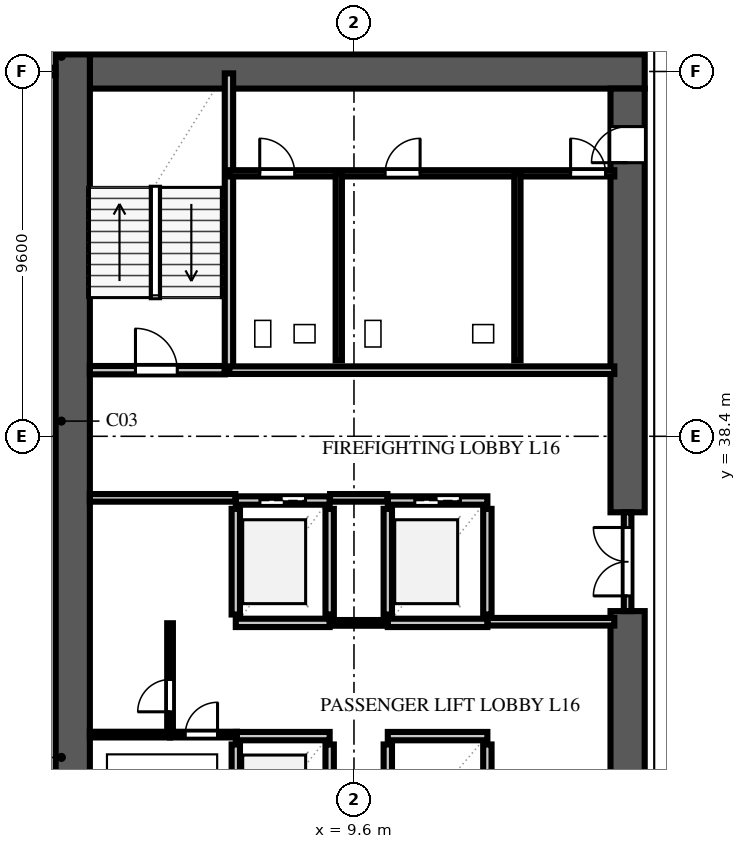
"""IFC4 building model, lengths in metres.
Left out: names, types, materials, properties, quantities, classifications, styles, units other than length and angle.
Written with IfcOpenShell. Run it as: python <this file> out.ifc"""

import sys

from ifc_helpers import new_model, si_unit, direction, frame, frame_2d, origin, place, context, subcontext, project, spatial, rectangle, extrude, element, fill, save


model = new_model("IFC4")
c1 = context("Model", 3, precision=1e-05, world=origin(), true_north=direction((0.0, 1.0)))
c2 = subcontext(c1, "Body", "Model", "MODEL_VIEW")
j1 = project(units=[si_unit("LENGTHUNIT", "METRE"), si_unit("PLANEANGLEUNIT", "RADIAN")], contexts=[c1])
p1 = place(None, origin())
s1 = spatial("IfcSite", under=j1, at=p1, CompositionType="ELEMENT")
p2 = place(p1, origin())
s2 = spatial("IfcBuilding", under=s1, at=p2, CompositionType="ELEMENT")
p3 = place(p2, frame((0.0, 0.0, 66.0)))
s3 = spatial("IfcBuildingStorey", under=s2, at=p3, CompositionType="ELEMENT", Elevation=66.0)
p4 = place(p3, frame((2.65, 48.0, 0.0), z_axis=(0.0, 0.0, 1.0), x_axis=(1.0, 0.0, 0.0)))
e1 = element("IfcWall", 1, at=p4, inside=s3, PredefinedType="SHEAR", context=c2, shape_type="SweptSolid", body=[
    extrude(rectangle(XDim=14.6, YDim=0.9, at=frame_2d((7.3, 0.0))), origin(), (0.0, 0.0, 1.0), 3.54),
])
p5 = place(p3, frame((2.2, 9.15, 0.0), z_axis=(0.0, 0.0, 1.0), x_axis=(0.0, 1.0, 0.0)))
e2 = element("IfcWall", 2, at=p5, inside=s3, PredefinedType="SHEAR", context=c2, shape_type="SweptSolid", body=[
    extrude(rectangle(XDim=39.3, YDim=0.9, at=frame_2d((19.65, 0.0))), origin(), (0.0, 0.0, 1.0), 3.54),
])
p6 = place(p3, frame((16.8, 26.0, 0.0), z_axis=(0.0, 0.0, 1.0), x_axis=(0.0, 1.0, 0.0)))
e3 = element("IfcWall", 3, at=p6, inside=s3, PredefinedType="SHEAR", context=c2, shape_type="SweptSolid", body=[
    extrude(rectangle(XDim=7.8, YDim=0.9, at=frame_2d((3.9, 0.0))), origin(), (0.0, 0.0, 1.0), 3.54),
])
p7 = place(p3, frame((16.8, 36.4, 0.0), z_axis=(0.0, 0.0, 1.0), x_axis=(0.0, 1.0, 0.0)))
e4 = element("IfcWall", 4, at=p7, inside=s3, PredefinedType="SHEAR", context=c2, shape_type="SweptSolid", body=[
    extrude(rectangle(XDim=11.15, YDim=0.9, at=frame_2d((5.575, 0.0))), origin(), (0.0, 0.0, 1.0), 3.54),
])
p8 = place(p7, frame((9.2, 0.0, 0.0)))
e5 = element("IfcOpeningElement", 5, at=p8, cuts=e4, PredefinedType="OPENING", context=c2, shape_type="SweptSolid", body=[
    extrude(rectangle(XDim=0.95, YDim=2.15, at=frame_2d((0.475, 1.075))), frame((0.0, 0.462, 0.0), z_axis=(0.0, -1.0, 0.0), x_axis=(1.0, 0.0, 0.0)), (0.0, 0.0, 1.0), 0.924),
])
p9 = place(p3, frame((2.65, 40.14, 0.0), z_axis=(0.0, 0.0, 1.0), x_axis=(1.0, 0.0, 0.0)))
e6 = element("IfcWall", 6, at=p9, inside=s3, PredefinedType="SOLIDWALL", context=c2, shape_type="SweptSolid", body=[
    extrude(rectangle(XDim=3.55, YDim=0.22, at=frame_2d((1.775, 0.0))), origin(), (0.0, 0.0, 1.0), 3.54),
])
p10 = place(p9, frame((1.2, 0.0, 0.0)))
e7 = element("IfcOpeningElement", 7, at=p10, cuts=e6, PredefinedType="OPENING", context=c2, shape_type="SweptSolid", body=[
    extrude(rectangle(XDim=1.1, YDim=2.2, at=frame_2d((0.55, 1.1))), frame((0.0, 0.122, 0.0), z_axis=(0.0, -1.0, 0.0), x_axis=(1.0, 0.0, 0.0)), (0.0, 0.0, 1.0), 0.244),
])
p11 = place(p3, frame((6.31, 40.14, 0.0), z_axis=(0.0, 0.0, 1.0), x_axis=(0.0, 1.0, 0.0)))
e8 = element("IfcWall", 8, at=p11, inside=s3, PredefinedType="SOLIDWALL", context=c2, shape_type="SweptSolid", body=[
    extrude(rectangle(XDim=7.81, YDim=0.22, at=frame_2d((3.905, 0.0))), origin(), (0.0, 0.0, 1.0), 3.54),
])
p12 = place(p3, frame((6.49, 27.71, 0.0), z_axis=(0.0, 0.0, 1.0), x_axis=(0.0, 1.0, 0.0)))
e9 = element("IfcWall", 9, at=p12, inside=s3, PredefinedType="SOLIDWALL", context=c2, shape_type="SweptSolid", body=[
    extrude(rectangle(XDim=2.58, YDim=0.22, at=frame_2d((1.29, 0.0))), origin(), (0.0, 0.0, 1.0), 3.54),
])
p13 = place(p3, frame((8.96, 27.71, 0.0), z_axis=(0.0, 0.0, 1.0), x_axis=(0.0, 1.0, 0.0)))
e10 = element("IfcWall", 10, at=p13, inside=s3, PredefinedType="SOLIDWALL", context=c2, shape_type="SweptSolid", body=[
    extrude(rectangle(XDim=2.58, YDim=0.22, at=frame_2d((1.29, 0.0))), origin(), (0.0, 0.0, 1.0), 3.54),
])
p14 = place(p13, frame((0.74, 0.0, 0.0)))
e11 = element("IfcOpeningElement", 11, at=p14, cuts=e10, PredefinedType="OPENING", context=c2, shape_type="SweptSolid", body=[
    extrude(rectangle(XDim=1.1, YDim=2.2, at=frame_2d((0.55, 1.1))), frame((0.0, 0.122, 0.0), z_axis=(0.0, -1.0, 0.0), x_axis=(1.0, 0.0, 0.0)), (0.0, 0.0, 1.0), 0.244),
])
p15 = place(p3, frame((6.49, 30.51, 0.0), z_axis=(0.0, 0.0, 1.0), x_axis=(1.0, 0.0, 0.0)))
e12 = element("IfcWall", 12, at=p15, inside=s3, PredefinedType="SOLIDWALL", context=c2, shape_type="SweptSolid", body=[
    extrude(rectangle(XDim=2.47, YDim=0.22, at=frame_2d((1.235, 0.0))), origin(), (0.0, 0.0, 1.0), 3.54),
])
for number, where, z_axis, x_axis in (
    (13, (10.49, 27.71, 0.0), (0.0, 0.0, 1.0), (0.0, 1.0, 0.0)),
    (14, (13.11, 27.71, 0.0), (0.0, 0.0, 1.0), (0.0, 1.0, 0.0)),
):
    element("IfcWall", number, at=place(p3, frame(where, z_axis=z_axis, x_axis=x_axis)), inside=s3, PredefinedType="SOLIDWALL", context=c2, shape_type="SweptSolid", body=[
        extrude(rectangle(XDim=2.58, YDim=0.22, at=frame_2d((1.29, 0.0))), origin(), (0.0, 0.0, 1.0), 3.54),
    ])
p16 = place(p3, frame((10.49, 30.51, 0.0), z_axis=(0.0, 0.0, 1.0), x_axis=(1.0, 0.0, 0.0)))
e15 = element("IfcWall", 15, at=p16, inside=s3, PredefinedType="SOLIDWALL", context=c2, shape_type="SweptSolid", body=[
    extrude(rectangle(XDim=2.62, YDim=0.22, at=frame_2d((1.31, 0.0))), origin(), (0.0, 0.0, 1.0), 3.54),
])
for number, where, z_axis, x_axis in (
    (16, (6.49, 33.71, 0.0), (0.0, 0.0, 1.0), (0.0, 1.0, 0.0)),
    (17, (8.96, 33.71, 0.0), (0.0, 0.0, 1.0), (0.0, 1.0, 0.0)),
):
    element("IfcWall", number, at=place(p3, frame(where, z_axis=z_axis, x_axis=x_axis)), inside=s3, PredefinedType="SOLIDWALL", context=c2, shape_type="SweptSolid", body=[
        extrude(rectangle(XDim=2.78, YDim=0.22, at=frame_2d((1.39, 0.0))), origin(), (0.0, 0.0, 1.0), 3.54),
    ])
p17 = place(p3, frame((6.49, 33.49, 0.0), z_axis=(0.0, 0.0, 1.0), x_axis=(1.0, 0.0, 0.0)))
e18 = element("IfcWall", 18, at=p17, inside=s3, PredefinedType="SOLIDWALL", context=c2, shape_type="SweptSolid", body=[
    extrude(rectangle(XDim=2.47, YDim=0.22, at=frame_2d((1.235, 0.0))), origin(), (0.0, 0.0, 1.0), 3.54),
])
p18 = place(p3, frame((6.49, 36.71, 0.0), z_axis=(0.0, 0.0, 1.0), x_axis=(1.0, 0.0, 0.0)))
e19 = element("IfcWall", 19, at=p18, inside=s3, PredefinedType="SOLIDWALL", context=c2, shape_type="SweptSolid", body=[
    extrude(rectangle(XDim=2.47, YDim=0.22, at=frame_2d((1.235, 0.0))), origin(), (0.0, 0.0, 1.0), 3.54),
])
p19 = place(p18, frame((0.635, 0.0, 0.0)))
e20 = element("IfcOpeningElement", 20, at=p19, cuts=e19, PredefinedType="OPENING", context=c2, shape_type="SweptSolid", body=[
    extrude(rectangle(XDim=1.2, YDim=2.2, at=frame_2d((0.6, 1.1))), frame((0.0, 0.122, 0.0), z_axis=(0.0, -1.0, 0.0), x_axis=(1.0, 0.0, 0.0)), (0.0, 0.0, 1.0), 0.244),
])
for number, where, z_axis, x_axis in (
    (21, (10.49, 33.71, 0.0), (0.0, 0.0, 1.0), (0.0, 1.0, 0.0)),
    (22, (13.11, 33.71, 0.0), (0.0, 0.0, 1.0), (0.0, 1.0, 0.0)),
):
    element("IfcWall", number, at=place(p3, frame(where, z_axis=z_axis, x_axis=x_axis)), inside=s3, PredefinedType="SOLIDWALL", context=c2, shape_type="SweptSolid", body=[
        extrude(rectangle(XDim=2.78, YDim=0.22, at=frame_2d((1.39, 0.0))), origin(), (0.0, 0.0, 1.0), 3.54),
    ])
p20 = place(p3, frame((10.49, 33.49, 0.0), z_axis=(0.0, 0.0, 1.0), x_axis=(1.0, 0.0, 0.0)))
e23 = element("IfcWall", 23, at=p20, inside=s3, PredefinedType="SOLIDWALL", context=c2, shape_type="SweptSolid", body=[
    extrude(rectangle(XDim=2.62, YDim=0.22, at=frame_2d((1.31, 0.0))), origin(), (0.0, 0.0, 1.0), 3.54),
])
p21 = place(p3, frame((10.49, 36.71, 0.0), z_axis=(0.0, 0.0, 1.0), x_axis=(1.0, 0.0, 0.0)))
e24 = element("IfcWall", 24, at=p21, inside=s3, PredefinedType="SOLIDWALL", context=c2, shape_type="SweptSolid", body=[
    extrude(rectangle(XDim=2.62, YDim=0.22, at=frame_2d((1.31, 0.0))), origin(), (0.0, 0.0, 1.0), 3.54),
])
p22 = place(p21, frame((0.71, 0.0, 0.0)))
e25 = element("IfcOpeningElement", 25, at=p22, cuts=e24, PredefinedType="OPENING", context=c2, shape_type="SweptSolid", body=[
    extrude(rectangle(XDim=1.2, YDim=2.2, at=frame_2d((0.6, 1.1))), frame((0.0, 0.122, 0.0), z_axis=(0.0, -1.0, 0.0), x_axis=(1.0, 0.0, 0.0)), (0.0, 0.0, 1.0), 0.244),
])
p23 = place(p3, frame((2.65, 36.78, 0.0), z_axis=(0.0, 0.0, 1.0), x_axis=(1.0, 0.0, 0.0)))
e26 = element("IfcWall", 26, at=p23, inside=s3, PredefinedType="SOLIDWALL", context=c2, shape_type="SweptSolid", body=[
    extrude(rectangle(XDim=3.83, YDim=0.2, at=frame_2d((1.915, 0.0))), origin(), (0.0, 0.0, 1.0), 3.54),
])
p24 = place(p3, frame((8.97, 36.78, 0.0), z_axis=(0.0, 0.0, 1.0), x_axis=(1.0, 0.0, 0.0)))
e27 = element("IfcWall", 27, at=p24, inside=s3, PredefinedType="SOLIDWALL", context=c2, shape_type="SweptSolid", body=[
    extrude(rectangle(XDim=1.51, YDim=0.2, at=frame_2d((0.755, 0.0))), origin(), (0.0, 0.0, 1.0), 3.54),
])
p25 = place(p3, frame((13.12, 33.52, 0.0), z_axis=(0.0, 0.0, 1.0), x_axis=(1.0, 0.0, 0.0)))
e28 = element("IfcWall", 28, at=p25, inside=s3, PredefinedType="SOLIDWALL", context=c2, shape_type="SweptSolid", body=[
    extrude(rectangle(XDim=3.33, YDim=0.2, at=frame_2d((1.665, 0.0))), origin(), (0.0, 0.0, 1.0), 3.54),
])
p26 = place(p3, frame((6.32, 40.14, 0.0), z_axis=(0.0, 0.0, 1.0), x_axis=(1.0, 0.0, 0.0)))
e29 = element("IfcWall", 29, at=p26, inside=s3, PredefinedType="SOLIDWALL", context=c2, shape_type="SweptSolid", body=[
    extrude(rectangle(XDim=10.13, YDim=0.2, at=frame_2d((5.065, 0.0))), origin(), (0.0, 0.0, 1.0), 3.54),
])
p27 = place(p3, frame((16.8, 33.8, 0.0), z_axis=(0.0, 0.0, 1.0), x_axis=(0.0, 1.0, 0.0)))
e30 = element("IfcWall", 30, at=p27, inside=s3, PredefinedType="SOLIDWALL", context=c2, shape_type="SweptSolid", body=[
    extrude(rectangle(XDim=2.6, YDim=0.2, at=frame_2d((1.3, 0.0))), origin(), (0.0, 0.0, 1.0), 3.54),
])
p28 = place(p27, frame((0.4, 0.0, 0.0)))
e31 = element("IfcOpeningElement", 31, at=p28, cuts=e30, PredefinedType="OPENING", context=c2, shape_type="SweptSolid", body=[
    extrude(rectangle(XDim=1.8, YDim=2.2, at=frame_2d((0.9, 1.1))), frame((0.0, 0.112, 0.0), z_axis=(0.0, -1.0, 0.0), x_axis=(1.0, 0.0, 0.0)), (0.0, 0.0, 1.0), 0.224),
])
p29 = place(p3, frame((8.965, 33.49, 0.0), z_axis=(0.0, 0.0, 1.0), x_axis=(1.0, 0.0, 0.0)))
e32 = element("IfcWall", 32, at=p29, inside=s3, PredefinedType="PARTITIONING", context=c2, shape_type="SweptSolid", body=[
    extrude(rectangle(XDim=1.52, YDim=0.15, at=frame_2d((0.76, 0.0))), origin(), (0.0, 0.0, 1.0), 3.54),
])
p30 = place(p3, frame((4.76, 30.55, 0.0), z_axis=(0.0, 0.0, 1.0), x_axis=(0.0, 1.0, 0.0)))
e33 = element("IfcWall", 33, at=p30, inside=s3, PredefinedType="PARTITIONING", context=c2, shape_type="SweptSolid", body=[
    extrude(rectangle(XDim=2.93, YDim=0.15, at=frame_2d((1.465, 0.0))), origin(), (0.0, 0.0, 1.0), 3.54),
])
p31 = place(p30, frame((0.6, 0.0, 0.0)))
e34 = element("IfcOpeningElement", 34, at=p31, cuts=e33, PredefinedType="OPENING", context=c2, shape_type="SweptSolid", body=[
    extrude(rectangle(XDim=0.85, YDim=2.1, at=frame_2d((0.425, 1.05))), frame((0.0, 0.087, 0.0), z_axis=(0.0, -1.0, 0.0), x_axis=(1.0, 0.0, 0.0)), (0.0, 0.0, 1.0), 0.174),
])
p32 = place(p3, frame((4.76, 30.55, 0.0), z_axis=(0.0, 0.0, 1.0), x_axis=(1.0, 0.0, 0.0)))
e35 = element("IfcWall", 35, at=p32, inside=s3, PredefinedType="PARTITIONING", context=c2, shape_type="SweptSolid", body=[
    extrude(rectangle(XDim=1.76, YDim=0.15, at=frame_2d((0.88, 0.0))), origin(), (0.0, 0.0, 1.0), 3.54),
])
p33 = place(p32, frame((0.4, 0.0, 0.0)))
e36 = element("IfcOpeningElement", 36, at=p33, cuts=e35, PredefinedType="OPENING", context=c2, shape_type="SweptSolid", body=[
    extrude(rectangle(XDim=0.85, YDim=2.1, at=frame_2d((0.425, 1.05))), frame((0.0, 0.087, 0.0), z_axis=(0.0, -1.0, 0.0), x_axis=(1.0, 0.0, 0.0)), (0.0, 0.0, 1.0), 0.174),
])
p34 = place(p3, frame((2.65, 30.55, 0.0), z_axis=(0.0, 0.0, 1.0), x_axis=(1.0, 0.0, 0.0)))
e37 = element("IfcWall", 37, at=p34, inside=s3, PredefinedType="PARTITIONING", context=c2, shape_type="SweptSolid", body=[
    extrude(rectangle(XDim=2.11, YDim=0.15, at=frame_2d((1.055, 0.0))), origin(), (0.0, 0.0, 1.0), 3.54),
])
p35 = place(p3, frame((6.32, 45.32, 0.0), z_axis=(0.0, 0.0, 1.0), x_axis=(1.0, 0.0, 0.0)))
e38 = element("IfcWall", 38, at=p35, inside=s3, PredefinedType="PLUMBINGWALL", context=c2, shape_type="SweptSolid", body=[
    extrude(rectangle(XDim=10.13, YDim=0.165, at=frame_2d((5.065, 0.0))), origin(), (0.0, 0.0, 1.0), 3.54),
])
p36 = place(p35, frame((0.8, 0.0, 0.0)))
e39 = element("IfcOpeningElement", 39, at=p36, cuts=e38, PredefinedType="OPENING", context=c2, shape_type="SweptSolid", body=[
    extrude(rectangle(XDim=0.92, YDim=2.15, at=frame_2d((0.46, 1.075))), frame((0.0, 0.094, 0.0), z_axis=(0.0, -1.0, 0.0), x_axis=(1.0, 0.0, 0.0)), (0.0, 0.0, 1.0), 0.189),
])
p37 = place(p35, frame((4.1, 0.0, 0.0)))
e40 = element("IfcOpeningElement", 40, at=p37, cuts=e38, PredefinedType="OPENING", context=c2, shape_type="SweptSolid", body=[
    extrude(rectangle(XDim=0.92, YDim=2.15, at=frame_2d((0.46, 1.075))), frame((0.0, 0.094, 0.0), z_axis=(0.0, -1.0, 0.0), x_axis=(1.0, 0.0, 0.0)), (0.0, 0.0, 1.0), 0.189),
])
p38 = place(p35, frame((8.98, 0.0, 0.0)))
e41 = element("IfcOpeningElement", 41, at=p38, cuts=e38, PredefinedType="OPENING", context=c2, shape_type="SweptSolid", body=[
    extrude(rectangle(XDim=0.92, YDim=2.15, at=frame_2d((0.46, 1.075))), frame((0.0, 0.094, 0.0), z_axis=(0.0, -1.0, 0.0), x_axis=(1.0, 0.0, 0.0)), (0.0, 0.0, 1.0), 0.189),
])
for number, where, z_axis, x_axis in (
    (42, (9.2, 40.4, 0.0), (0.0, 0.0, 1.0), (0.0, 1.0, 0.0)),
    (43, (13.9, 40.4, 0.0), (0.0, 0.0, 1.0), (0.0, 1.0, 0.0)),
):
    element("IfcWall", number, at=place(p3, frame(where, z_axis=z_axis, x_axis=x_axis)), inside=s3, PredefinedType="PLUMBINGWALL", context=c2, shape_type="SweptSolid", body=[
        extrude(rectangle(XDim=4.92, YDim=0.165, at=frame_2d((2.46, 0.0))), origin(), (0.0, 0.0, 1.0), 3.54),
    ])
p39 = place(p3, frame((0.85, 48.0, 0.0), z_axis=(0.0, 0.0, 1.0), x_axis=(1.0, 0.0, 0.0)))
e44 = element("IfcWall", 44, at=p39, inside=s3, PredefinedType="SOLIDWALL", context=c2, shape_type="SweptSolid", body=[
    extrude(rectangle(XDim=0.895, YDim=0.2, at=frame_2d((0.448, 0.0))), origin(), (0.0, 0.0, 1.0), 3.54),
])
p40 = place(p10, origin())
e45 = element("IfcDoor", 45, at=p40, inside=s3, OperationType="SINGLE_SWING_LEFT", PredefinedType="DOOR", context=c2, shape_type="SweptSolid", body=[
    extrude(rectangle(XDim=1.1, YDim=2.2, at=frame_2d((0.55, 1.1))), frame((0.0, 0.025, 0.0), z_axis=(0.0, -1.0, 0.0), x_axis=(1.0, 0.0, 0.0)), (0.0, 0.0, 1.0), 0.05),
])
fill(e7, e45)
p41 = place(p19, origin())
e46 = element("IfcDoor", 46, at=p41, inside=s3, OperationType="DOUBLE_DOOR_SLIDING", PredefinedType="DOOR", context=c2, shape_type="SweptSolid", body=[
    extrude(rectangle(XDim=1.2, YDim=2.2, at=frame_2d((0.6, 1.1))), frame((0.0, 0.025, 0.0), z_axis=(0.0, -1.0, 0.0), x_axis=(1.0, 0.0, 0.0)), (0.0, 0.0, 1.0), 0.05),
])
fill(e20, e46)
p42 = place(p22, origin())
e47 = element("IfcDoor", 47, at=p42, inside=s3, OperationType="DOUBLE_DOOR_SLIDING", PredefinedType="DOOR", context=c2, shape_type="SweptSolid", body=[
    extrude(rectangle(XDim=1.2, YDim=2.2, at=frame_2d((0.6, 1.1))), frame((0.0, 0.025, 0.0), z_axis=(0.0, -1.0, 0.0), x_axis=(1.0, 0.0, 0.0)), (0.0, 0.0, 1.0), 0.05),
])
fill(e25, e47)
p43 = place(p8, origin())
e48 = element("IfcDoor", 48, at=p43, inside=s3, OperationType="SINGLE_SWING_LEFT", PredefinedType="DOOR", context=c2, shape_type="SweptSolid", body=[
    extrude(rectangle(XDim=0.95, YDim=2.15, at=frame_2d((0.475, 1.075))), frame((0.0, 0.025, 0.0), z_axis=(0.0, -1.0, 0.0), x_axis=(1.0, 0.0, 0.0)), (0.0, 0.0, 1.0), 0.05),
])
fill(e5, e48)
p44 = place(p28, origin())
e49 = element("IfcDoor", 49, at=p44, inside=s3, OperationType="DOUBLE_DOOR_SINGLE_SWING", PredefinedType="DOOR", context=c2, shape_type="SweptSolid", body=[
    extrude(rectangle(XDim=1.8, YDim=2.2, at=frame_2d((0.9, 1.1))), frame((0.0, 0.025, 0.0), z_axis=(0.0, -1.0, 0.0), x_axis=(1.0, 0.0, 0.0)), (0.0, 0.0, 1.0), 0.05),
])
fill(e31, e49)
p45 = place(p31, origin())
e50 = element("IfcDoor", 50, at=p45, inside=s3, OperationType="SINGLE_SWING_LEFT", PredefinedType="DOOR", context=c2, shape_type="SweptSolid", body=[
    extrude(rectangle(XDim=0.85, YDim=2.1, at=frame_2d((0.425, 1.05))), frame((0.0, 0.025, 0.0), z_axis=(0.0, -1.0, 0.0), x_axis=(1.0, 0.0, 0.0)), (0.0, 0.0, 1.0), 0.05),
])
fill(e34, e50)
p46 = place(p33, origin())
e51 = element("IfcDoor", 51, at=p46, inside=s3, OperationType="SINGLE_SWING_RIGHT", PredefinedType="DOOR", context=c2, shape_type="SweptSolid", body=[
    extrude(rectangle(XDim=0.85, YDim=2.1, at=frame_2d((0.425, 1.05))), frame((0.0, 0.025, 0.0), z_axis=(0.0, -1.0, 0.0), x_axis=(1.0, 0.0, 0.0)), (0.0, 0.0, 1.0), 0.05),
])
fill(e36, e51)
p47 = place(p36, origin())
e52 = element("IfcDoor", 52, at=p47, inside=s3, OperationType="SINGLE_SWING_LEFT", PredefinedType="DOOR", context=c2, shape_type="SweptSolid", body=[
    extrude(rectangle(XDim=0.92, YDim=2.15, at=frame_2d((0.46, 1.075))), frame((0.0, 0.025, 0.0), z_axis=(0.0, -1.0, 0.0), x_axis=(1.0, 0.0, 0.0)), (0.0, 0.0, 1.0), 0.05),
])
fill(e39, e52)
p48 = place(p37, origin())
e53 = element("IfcDoor", 53, at=p48, inside=s3, OperationType="SINGLE_SWING_RIGHT", PredefinedType="DOOR", context=c2, shape_type="SweptSolid", body=[
    extrude(rectangle(XDim=0.92, YDim=2.15, at=frame_2d((0.46, 1.075))), frame((0.0, 0.025, 0.0), z_axis=(0.0, -1.0, 0.0), x_axis=(1.0, 0.0, 0.0)), (0.0, 0.0, 1.0), 0.05),
])
fill(e40, e53)
p49 = place(p38, origin())
e54 = element("IfcDoor", 54, at=p49, inside=s3, OperationType="SINGLE_SWING_LEFT", PredefinedType="DOOR", context=c2, shape_type="SweptSolid", body=[
    extrude(rectangle(XDim=0.92, YDim=2.15, at=frame_2d((0.46, 1.075))), frame((0.0, 0.025, 0.0), z_axis=(0.0, -1.0, 0.0), x_axis=(1.0, 0.0, 0.0)), (0.0, 0.0, 1.0), 0.05),
])
fill(e41, e54)
save(model, sys.argv[1])
